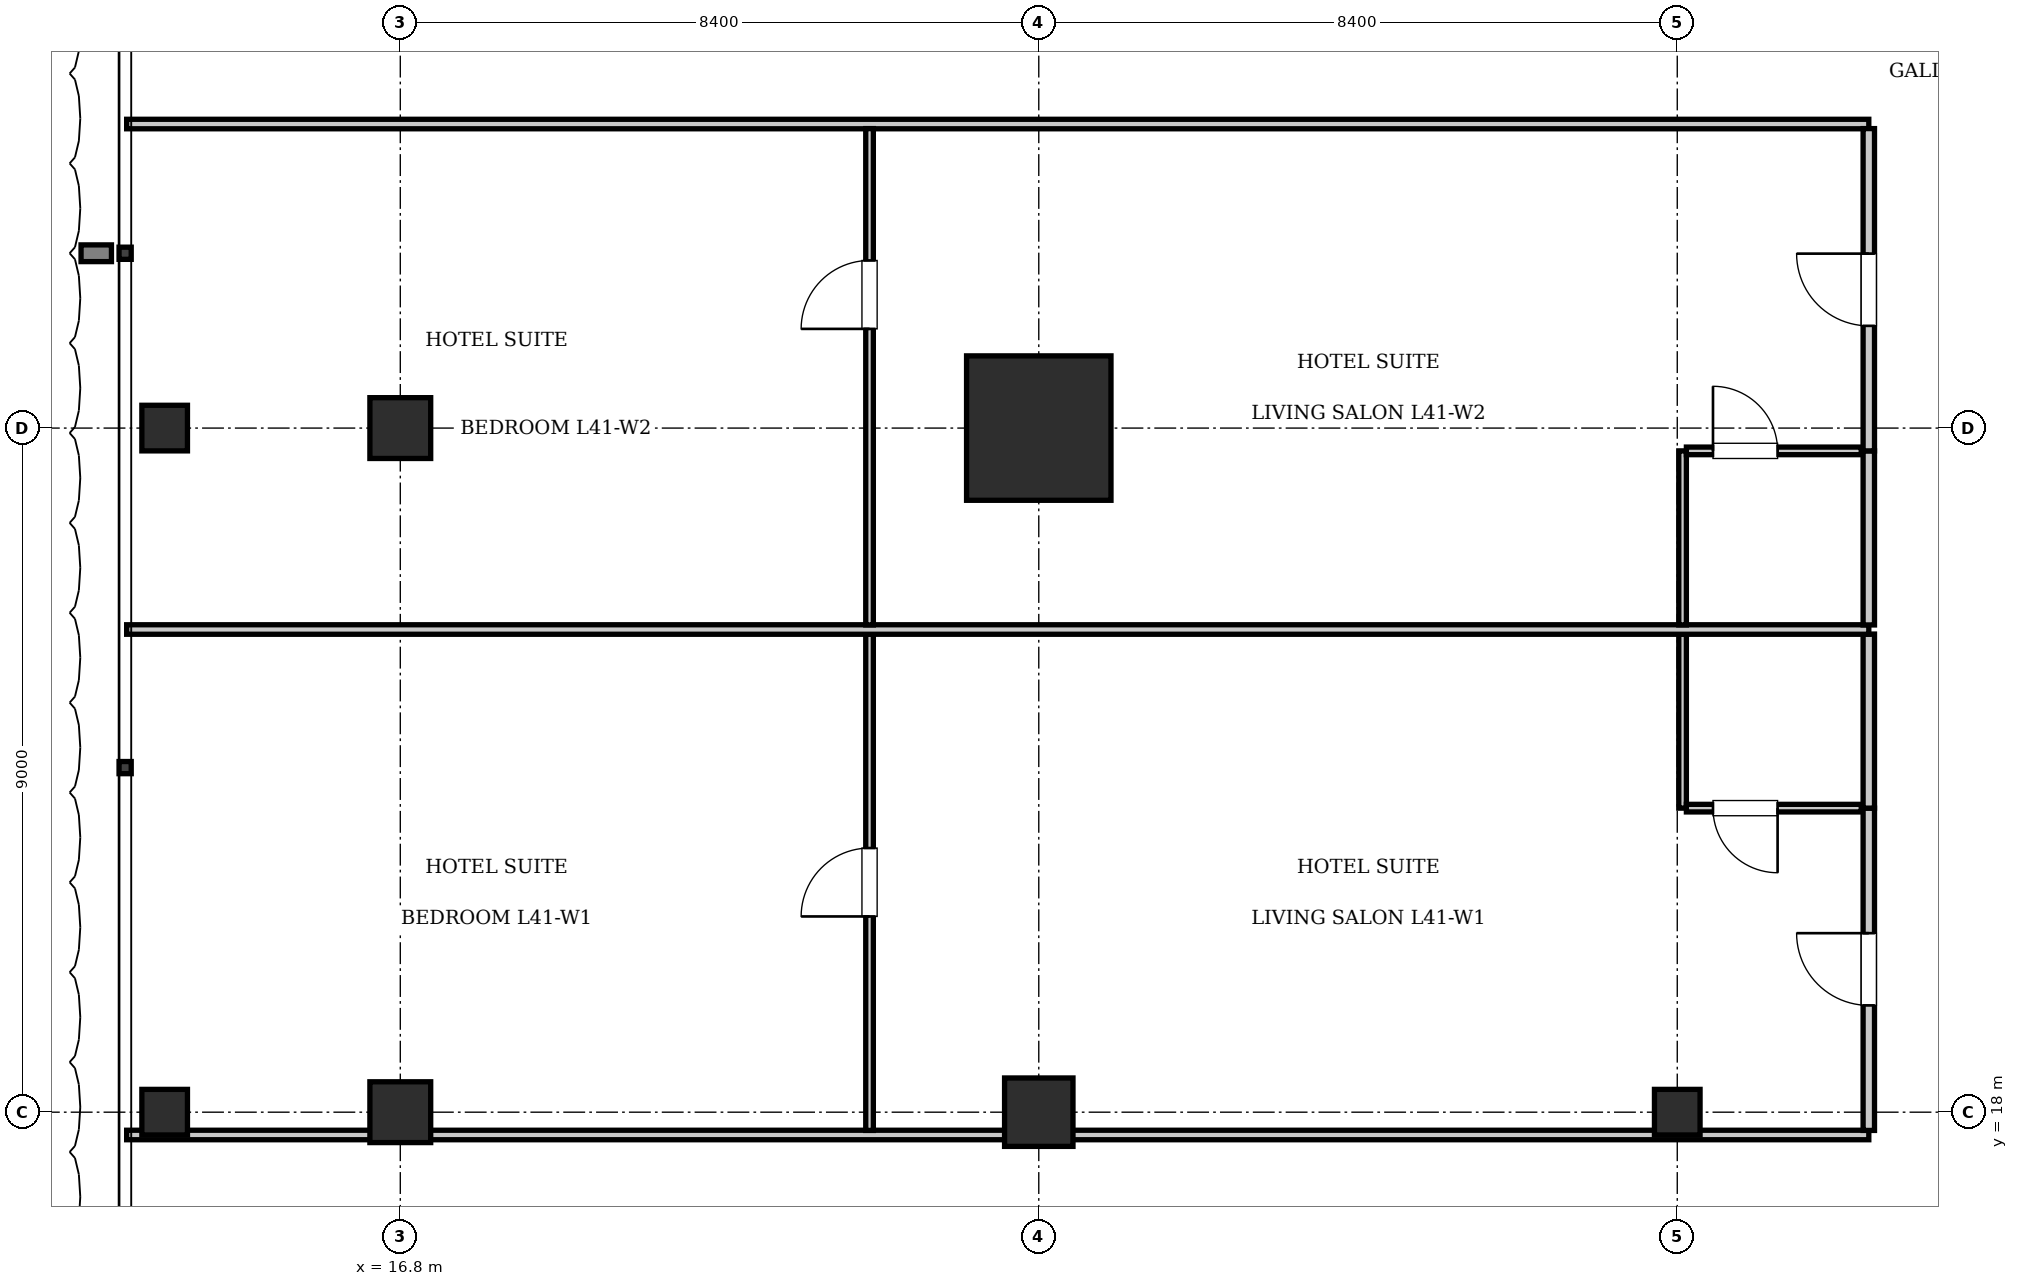
"""IFC4 building model, lengths in metres.
Left out: names, types, materials, properties, quantities, classifications, styles, units other than length and angle.
Written with IfcOpenShell. Run it as: python <this file> out.ifc"""

import sys

from ifc_helpers import new_model, si_unit, direction, frame, frame_2d, origin, origin_2d, place, context, subcontext, project, spatial, rectangle, i_section, extrude, element, fill, save


model = new_model("IFC4")
c1 = context("Model", 3, precision=1e-05, world=origin(), true_north=direction((0.0, 1.0)))
c2 = subcontext(c1, "Body", "Model", "MODEL_VIEW")
j1 = project(units=[si_unit("LENGTHUNIT", "METRE"), si_unit("PLANEANGLEUNIT", "RADIAN")], contexts=[c1])
p1 = place(None, origin())
s1 = spatial("IfcSite", under=j1, at=p1, CompositionType="ELEMENT")
p2 = place(p1, origin())
s2 = spatial("IfcBuilding", under=s1, at=p2, CompositionType="ELEMENT")
p3 = place(p2, frame((0.0, 0.0, 169.75)))
s3 = spatial("IfcBuildingStorey", under=s2, at=p3, CompositionType="ELEMENT", Elevation=169.75)
p4 = place(p3, frame((25.2, 27.0, 0.0), z_axis=(0.0, 0.0, 1.0), x_axis=(1.0, 0.0, 0.0)))
e1 = element("IfcColumn", 1, at=p4, inside=s3, PredefinedType="COLUMN", context=c2, shape_type="SweptSolid", body=[
    extrude(rectangle(XDim=1.9, YDim=1.9, at=origin_2d()), origin(), (0.0, 0.0, 1.0), 3.85),
])
p5 = place(p3, frame((25.2, 18.0, 0.0), z_axis=(0.0, 0.0, 1.0), x_axis=(1.0, 0.0, 0.0)))
e2 = element("IfcColumn", 2, at=p5, inside=s3, PredefinedType="COLUMN", context=c2, shape_type="SweptSolid", body=[
    extrude(rectangle(XDim=0.9, YDim=0.9, at=origin_2d()), origin(), (0.0, 0.0, 1.0), 3.85),
])
p6 = place(p3, frame((33.6, 18.0, 0.0), z_axis=(0.0, 0.0, 1.0), x_axis=(1.0, 0.0, 0.0)))
e3 = element("IfcColumn", 3, at=p6, inside=s3, PredefinedType="COLUMN", context=c2, shape_type="SweptSolid", body=[
    extrude(i_section(OverallWidth=0.6, OverallDepth=0.6, WebThickness=0.025, FlangeThickness=0.038, at=origin_2d()), origin(), (0.0, 0.0, 1.0), 3.85),
])
for number, where, z_axis, x_axis in (
    (4, (16.8, 18.0, 0.0), (0.0, 0.0, 1.0), (1.0, 0.0, 0.0)),
    (5, (16.8, 27.0, 0.0), (0.0, 0.0, 1.0), (1.0, 0.0, 0.0)),
):
    element("IfcColumn", number, at=place(p3, frame(where, z_axis=z_axis, x_axis=x_axis)), inside=s3, PredefinedType="COLUMN", context=c2, shape_type="SweptSolid", body=[
        extrude(rectangle(XDim=0.8, YDim=0.8, at=origin_2d()), origin(), (0.0, 0.0, 1.0), 3.85),
    ])
for number, where, z_axis, x_axis in (
    (6, (13.7, 18.0, 0.0), (0.0, 0.0, 1.0), (1.0, 0.0, 0.0)),
    (7, (13.7, 27.0, 0.0), (0.0, 0.0, 1.0), (1.0, 0.0, 0.0)),
):
    element("IfcColumn", number, at=place(p3, frame(where, z_axis=z_axis, x_axis=x_axis)), inside=s3, PredefinedType="COLUMN", context=c2, shape_type="SweptSolid", body=[
        extrude(i_section(OverallWidth=0.6, OverallDepth=0.6, WebThickness=0.025, FlangeThickness=0.038, at=origin_2d()), origin(), (0.0, 0.0, 1.0), 3.85),
    ])
for number, where, z_axis, x_axis in (
    (8, (13.2, 17.7, 0.0), (0.0, 0.0, 1.0), (1.0, 0.0, 0.0)),
    (9, (13.2, 31.0, 0.0), (0.0, 0.0, 1.0), (1.0, 0.0, 0.0)),
):
    element("IfcWall", number, at=place(p3, frame(where, z_axis=z_axis, x_axis=x_axis)), inside=s3, PredefinedType="PARTITIONING", context=c2, shape_type="SweptSolid", body=[
        extrude(rectangle(XDim=22.92, YDim=0.125, at=frame_2d((11.46, 0.0))), origin(), (0.0, 0.0, 1.0), 3.61),
    ])
p7 = place(p3, frame((36.12, 17.76, 0.0), z_axis=(0.0, 0.0, 1.0), x_axis=(0.0, 1.0, 0.0)))
e10 = element("IfcWall", 10, at=p7, inside=s3, PredefinedType="PARTITIONING", context=c2, shape_type="SweptSolid", body=[
    extrude(rectangle(XDim=4.24, YDim=0.15, at=frame_2d((2.12, 0.0))), origin(), (0.0, 0.0, 1.0), 3.61),
])
p8 = place(p7, frame((1.645, 0.0, 0.0)))
e11 = element("IfcOpeningElement", 11, at=p8, cuts=e10, PredefinedType="OPENING", context=c2, shape_type="SweptSolid", body=[
    extrude(rectangle(XDim=0.95, YDim=2.15, at=frame_2d((0.475, 1.075))), frame((0.0, 0.085, 0.0), z_axis=(0.0, -1.0, 0.0), x_axis=(1.0, 0.0, 0.0)), (0.0, 0.0, 1.0), 0.17),
])
p9 = place(p3, frame((36.12, 22.0, 0.0), z_axis=(0.0, 0.0, 1.0), x_axis=(0.0, 1.0, 0.0)))
e12 = element("IfcWall", 12, at=p9, inside=s3, PredefinedType="PARTITIONING", context=c2, shape_type="SweptSolid", body=[
    extrude(rectangle(XDim=2.29, YDim=0.15, at=frame_2d((1.145, 0.0))), origin(), (0.0, 0.0, 1.0), 3.61),
])
p10 = place(p3, frame((33.67, 22.0, 0.0), z_axis=(0.0, 0.0, 1.0), x_axis=(0.0, 1.0, 0.0)))
e13 = element("IfcWall", 13, at=p10, inside=s3, PredefinedType="PARTITIONING", context=c2, shape_type="SweptSolid", body=[
    extrude(rectangle(XDim=2.29, YDim=0.1, at=frame_2d((1.145, 0.0))), origin(), (0.0, 0.0, 1.0), 3.007),
])
p11 = place(p3, frame((33.72, 22.0, 0.0), z_axis=(0.0, 0.0, 1.0), x_axis=(1.0, 0.0, 0.0)))
e14 = element("IfcWall", 14, at=p11, inside=s3, PredefinedType="PARTITIONING", context=c2, shape_type="SweptSolid", body=[
    extrude(rectangle(XDim=2.3, YDim=0.1, at=frame_2d((1.15, 0.0))), origin(), (0.0, 0.0, 1.0), 3.61),
])
p12 = place(p11, frame((0.35, 0.0, 0.0)))
e15 = element("IfcOpeningElement", 15, at=p12, cuts=e14, PredefinedType="OPENING", context=c2, shape_type="SweptSolid", body=[
    extrude(rectangle(XDim=0.85, YDim=2.1, at=frame_2d((0.425, 1.05))), frame((0.0, 0.06, 0.0), z_axis=(0.0, -1.0, 0.0), x_axis=(1.0, 0.0, 0.0)), (0.0, 0.0, 1.0), 0.12),
])
p13 = place(p3, frame((22.974, 17.76, 0.0), z_axis=(0.0, 0.0, 1.0), x_axis=(0.0, 1.0, 0.0)))
e16 = element("IfcWall", 16, at=p13, inside=s3, PredefinedType="PARTITIONING", context=c2, shape_type="SweptSolid", body=[
    extrude(rectangle(XDim=6.53, YDim=0.1, at=frame_2d((3.265, 0.0))), origin(), (0.0, 0.0, 1.0), 3.61),
])
p14 = place(p13, frame((2.815, 0.0, 0.0)))
e17 = element("IfcOpeningElement", 17, at=p14, cuts=e16, PredefinedType="OPENING", context=c2, shape_type="SweptSolid", body=[
    extrude(rectangle(XDim=0.9, YDim=2.1, at=frame_2d((0.45, 1.05))), frame((0.0, 0.06, 0.0), z_axis=(0.0, -1.0, 0.0), x_axis=(1.0, 0.0, 0.0)), (0.0, 0.0, 1.0), 0.12),
])
p15 = place(p3, frame((13.2, 24.35, 0.0), z_axis=(0.0, 0.0, 1.0), x_axis=(1.0, 0.0, 0.0)))
e18 = element("IfcWall", 18, at=p15, inside=s3, PredefinedType="PARTITIONING", context=c2, shape_type="SweptSolid", body=[
    extrude(rectangle(XDim=22.92, YDim=0.125, at=frame_2d((11.46, 0.0))), origin(), (0.0, 0.0, 1.0), 3.61),
])
p16 = place(p3, frame((36.12, 24.41, 0.0), z_axis=(0.0, 0.0, 1.0), x_axis=(0.0, 1.0, 0.0)))
e19 = element("IfcWall", 19, at=p16, inside=s3, PredefinedType="PARTITIONING", context=c2, shape_type="SweptSolid", body=[
    extrude(rectangle(XDim=2.29, YDim=0.15, at=frame_2d((1.145, 0.0))), origin(), (0.0, 0.0, 1.0), 3.61),
])
p17 = place(p3, frame((36.12, 26.7, 0.0), z_axis=(0.0, 0.0, 1.0), x_axis=(0.0, 1.0, 0.0)))
e20 = element("IfcWall", 20, at=p17, inside=s3, PredefinedType="PARTITIONING", context=c2, shape_type="SweptSolid", body=[
    extrude(rectangle(XDim=4.24, YDim=0.15, at=frame_2d((2.12, 0.0))), origin(), (0.0, 0.0, 1.0), 3.61),
])
p18 = place(p17, frame((1.645, 0.0, 0.0)))
e21 = element("IfcOpeningElement", 21, at=p18, cuts=e20, PredefinedType="OPENING", context=c2, shape_type="SweptSolid", body=[
    extrude(rectangle(XDim=0.95, YDim=2.15, at=frame_2d((0.475, 1.075))), frame((0.0, 0.085, 0.0), z_axis=(0.0, -1.0, 0.0), x_axis=(1.0, 0.0, 0.0)), (0.0, 0.0, 1.0), 0.17),
])
p19 = place(p3, frame((33.67, 24.41, 0.0), z_axis=(0.0, 0.0, 1.0), x_axis=(0.0, 1.0, 0.0)))
e22 = element("IfcWall", 22, at=p19, inside=s3, PredefinedType="PARTITIONING", context=c2, shape_type="SweptSolid", body=[
    extrude(rectangle(XDim=2.29, YDim=0.1, at=frame_2d((1.145, 0.0))), origin(), (0.0, 0.0, 1.0), 3.007),
])
p20 = place(p3, frame((33.72, 26.7, 0.0), z_axis=(0.0, 0.0, 1.0), x_axis=(1.0, 0.0, 0.0)))
e23 = element("IfcWall", 23, at=p20, inside=s3, PredefinedType="PARTITIONING", context=c2, shape_type="SweptSolid", body=[
    extrude(rectangle(XDim=2.3, YDim=0.1, at=frame_2d((1.15, 0.0))), origin(), (0.0, 0.0, 1.0), 3.61),
])
p21 = place(p20, frame((0.35, 0.0, 0.0)))
e24 = element("IfcOpeningElement", 24, at=p21, cuts=e23, PredefinedType="OPENING", context=c2, shape_type="SweptSolid", body=[
    extrude(rectangle(XDim=0.85, YDim=2.1, at=frame_2d((0.425, 1.05))), frame((0.0, 0.06, 0.0), z_axis=(0.0, -1.0, 0.0), x_axis=(1.0, 0.0, 0.0)), (0.0, 0.0, 1.0), 0.12),
])
p22 = place(p3, frame((22.974, 24.41, 0.0), z_axis=(0.0, 0.0, 1.0), x_axis=(0.0, 1.0, 0.0)))
e25 = element("IfcWall", 25, at=p22, inside=s3, PredefinedType="PARTITIONING", context=c2, shape_type="SweptSolid", body=[
    extrude(rectangle(XDim=6.53, YDim=0.1, at=frame_2d((3.265, 0.0))), origin(), (0.0, 0.0, 1.0), 3.61),
])
p23 = place(p22, frame((3.895, 0.0, 0.0)))
e26 = element("IfcOpeningElement", 26, at=p23, cuts=e25, PredefinedType="OPENING", context=c2, shape_type="SweptSolid", body=[
    extrude(rectangle(XDim=0.9, YDim=2.1, at=frame_2d((0.45, 1.05))), frame((0.0, 0.06, 0.0), z_axis=(0.0, -1.0, 0.0), x_axis=(1.0, 0.0, 0.0)), (0.0, 0.0, 1.0), 0.12),
])
p24 = place(p12, frame((0.85, 0.0, 0.0), z_axis=(0.0, 0.0, 1.0), x_axis=(-1.0, 0.0, 0.0)))
e27 = element("IfcDoor", 27, at=p24, inside=s3, OperationType="SINGLE_SWING_LEFT", PredefinedType="DOOR", context=c2, shape_type="SweptSolid", body=[
    extrude(rectangle(XDim=0.85, YDim=2.1, at=frame_2d((0.425, 1.05))), frame((0.0, 0.025, 0.0), z_axis=(0.0, -1.0, 0.0), x_axis=(1.0, 0.0, 0.0)), (0.0, 0.0, 1.0), 0.05),
])
fill(e15, e27)
p25 = place(p8, origin())
e28 = element("IfcDoor", 28, at=p25, inside=s3, OperationType="SINGLE_SWING_RIGHT", PredefinedType="DOOR", context=c2, shape_type="SweptSolid", body=[
    extrude(rectangle(XDim=0.95, YDim=2.15, at=frame_2d((0.475, 1.075))), frame((0.0, 0.025, 0.0), z_axis=(0.0, -1.0, 0.0), x_axis=(1.0, 0.0, 0.0)), (0.0, 0.0, 1.0), 0.05),
])
fill(e11, e28)
p26 = place(p14, origin())
e29 = element("IfcDoor", 29, at=p26, inside=s3, OperationType="SINGLE_SWING_LEFT", PredefinedType="DOOR", context=c2, shape_type="SweptSolid", body=[
    extrude(rectangle(XDim=0.9, YDim=2.1, at=frame_2d((0.45, 1.05))), frame((0.0, 0.025, 0.0), z_axis=(0.0, -1.0, 0.0), x_axis=(1.0, 0.0, 0.0)), (0.0, 0.0, 1.0), 0.05),
])
fill(e17, e29)
p27 = place(p21, origin())
e30 = element("IfcDoor", 30, at=p27, inside=s3, OperationType="SINGLE_SWING_LEFT", PredefinedType="DOOR", context=c2, shape_type="SweptSolid", body=[
    extrude(rectangle(XDim=0.85, YDim=2.1, at=frame_2d((0.425, 1.05))), frame((0.0, 0.025, 0.0), z_axis=(0.0, -1.0, 0.0), x_axis=(1.0, 0.0, 0.0)), (0.0, 0.0, 1.0), 0.05),
])
fill(e24, e30)
p28 = place(p18, origin())
e31 = element("IfcDoor", 31, at=p28, inside=s3, OperationType="SINGLE_SWING_RIGHT", PredefinedType="DOOR", context=c2, shape_type="SweptSolid", body=[
    extrude(rectangle(XDim=0.95, YDim=2.15, at=frame_2d((0.475, 1.075))), frame((0.0, 0.025, 0.0), z_axis=(0.0, -1.0, 0.0), x_axis=(1.0, 0.0, 0.0)), (0.0, 0.0, 1.0), 0.05),
])
fill(e21, e31)
p29 = place(p23, origin())
e32 = element("IfcDoor", 32, at=p29, inside=s3, OperationType="SINGLE_SWING_LEFT", PredefinedType="DOOR", context=c2, shape_type="SweptSolid", body=[
    extrude(rectangle(XDim=0.9, YDim=2.1, at=frame_2d((0.45, 1.05))), frame((0.0, 0.025, 0.0), z_axis=(0.0, -1.0, 0.0), x_axis=(1.0, 0.0, 0.0)), (0.0, 0.0, 1.0), 0.05),
])
fill(e26, e32)
save(model, sys.argv[1])
